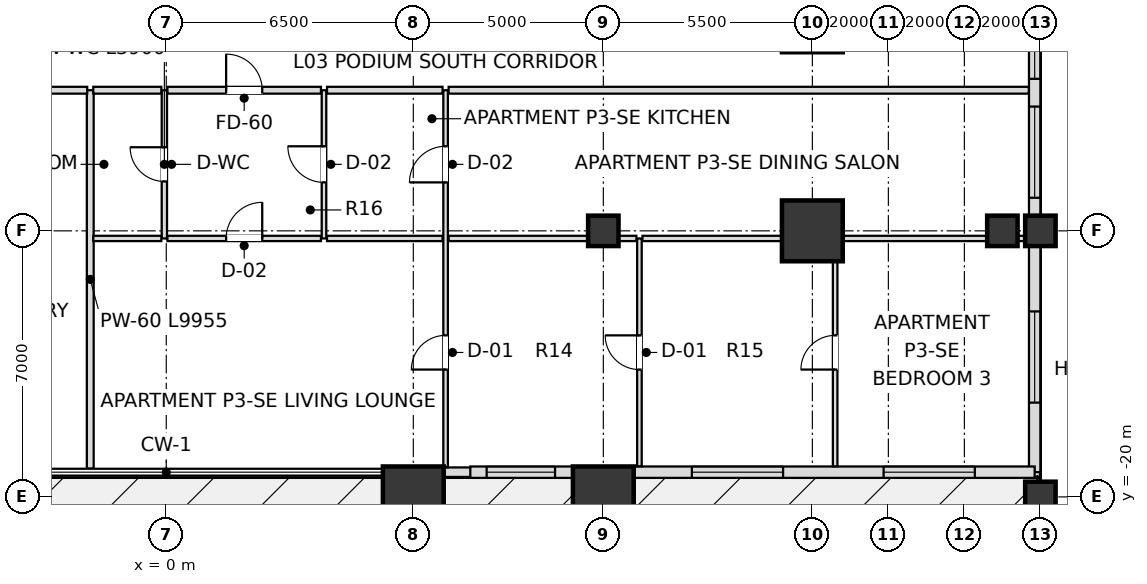
"""IFC4 building model, lengths in metres.
Left out: names, types, materials, properties, quantities, classifications, styles, units other than length and angle.
Written with IfcOpenShell. Run it as: python <this file> out.ifc"""

import sys

from ifc_helpers import new_model, si_unit, direction, frame, frame_2d, origin, origin_2d, place, context, subcontext, project, spatial, rectangle, extrude, element, fill, save


model = new_model("IFC4")
c1 = context("Model", 3, precision=1e-05, world=origin(), true_north=direction((0.0, 1.0)))
c2 = subcontext(c1, "Body", "Model", "MODEL_VIEW")
j1 = project(units=[si_unit("LENGTHUNIT", "METRE"), si_unit("PLANEANGLEUNIT", "RADIAN")], contexts=[c1])
p1 = place(None, origin())
s1 = spatial("IfcSite", under=j1, at=p1, CompositionType="ELEMENT")
p2 = place(p1, origin())
s2 = spatial("IfcBuilding", under=s1, at=p2, CompositionType="ELEMENT")
p3 = place(p2, frame((0.0, 0.0, 16.8)))
s3 = spatial("IfcBuildingStorey", under=s2, at=p3, CompositionType="ELEMENT", Elevation=16.8)
for number, where, z_axis, x_axis in (
    (1, (6.5, -20.0, 0.0), (0.0, 0.0, 1.0), (1.0, 0.0, 0.0)),
    (2, (11.5, -20.0, 0.0), (0.0, 0.0, 1.0), (1.0, 0.0, 0.0)),
    (3, (17.0, -13.0, 0.0), (0.0, 0.0, 1.0), (1.0, 0.0, 0.0)),
):
    element("IfcColumn", number, at=place(p3, frame(where, z_axis=z_axis, x_axis=x_axis)), inside=s3, PredefinedType="USERDEFINED", context=c2, shape_type="SweptSolid", body=[
        extrude(rectangle(XDim=1.6, YDim=1.6, at=origin_2d()), origin(), (0.0, 0.0, 1.0), 5.4),
    ])
for number, where, z_axis, x_axis in (
    (4, (23.0, -20.0, 0.0), (0.0, 0.0, 1.0), (1.0, 0.0, 0.0)),
    (5, (23.0, -13.0, 0.0), (0.0, 0.0, 1.0), (1.0, 0.0, 0.0)),
    (6, (11.5, -13.0, 0.0), (0.0, 0.0, 1.0), (1.0, 0.0, 0.0)),
    (7, (22.0, -13.0, 0.0), (0.0, 0.0, 1.0), (1.0, 0.0, 0.0)),
):
    element("IfcColumn", number, at=place(p3, frame(where, z_axis=z_axis, x_axis=x_axis)), inside=s3, PredefinedType="COLUMN", context=c2, shape_type="SweptSolid", body=[
        extrude(rectangle(XDim=0.8, YDim=0.8, at=origin_2d()), origin(), (0.0, 0.0, 1.0), 5.4),
    ])
p4 = place(p3, frame((22.85, -19.35, 0.0), z_axis=(0.0, 0.0, 1.0), x_axis=(0.0, 1.0, 0.0)))
e8 = element("IfcWall", 8, at=p4, inside=s3, PredefinedType="SOLIDWALL", context=c2, shape_type="SweptSolid", body=[
    extrude(rectangle(XDim=38.7, YDim=0.3, at=frame_2d((19.35, 0.0))), origin(), (0.0, 0.0, 1.0), 4.476),
])
p5 = place(p4, frame((1.83, 0.0, 0.8)))
e9 = element("IfcOpeningElement", 9, at=p5, cuts=e8, PredefinedType="OPENING", context=c2, shape_type="SweptSolid", body=[
    extrude(rectangle(XDim=2.4, YDim=2.2, at=frame_2d((1.2, 1.1))), frame((0.0, 0.16, 0.0), z_axis=(0.0, -1.0, 0.0), x_axis=(1.0, 0.0, 0.0)), (0.0, 0.0, 1.0), 0.32),
])
p6 = place(p4, frame((7.22, 0.0, 0.8)))
e10 = element("IfcOpeningElement", 10, at=p6, cuts=e8, PredefinedType="OPENING", context=c2, shape_type="SweptSolid", body=[
    extrude(rectangle(XDim=2.4, YDim=2.2, at=frame_2d((1.2, 1.1))), frame((0.0, 0.16, 0.0), z_axis=(0.0, -1.0, 0.0), x_axis=(1.0, 0.0, 0.0)), (0.0, 0.0, 1.0), 0.32),
])
p7 = place(p4, frame((10.35, 0.0, 0.72)))
e11 = element("IfcOpeningElement", 11, at=p7, cuts=e8, PredefinedType="OPENING", context=c2, shape_type="SweptSolid", body=[
    extrude(rectangle(XDim=1.2, YDim=1.68, at=frame_2d((0.6, 0.84))), frame((0.0, 0.16, 0.0), z_axis=(0.0, -1.0, 0.0), x_axis=(1.0, 0.0, 0.0)), (0.0, 0.0, 1.0), 0.32),
])
p8 = place(p4, frame((13.405, 0.0, 0.8)))
e12 = element("IfcOpeningElement", 12, at=p8, cuts=e8, PredefinedType="OPENING", context=c2, shape_type="SweptSolid", body=[
    extrude(rectangle(XDim=2.4, YDim=2.2, at=frame_2d((1.2, 1.1))), frame((0.0, 0.16, 0.0), z_axis=(0.0, -1.0, 0.0), x_axis=(1.0, 0.0, 0.0)), (0.0, 0.0, 1.0), 0.32),
])
p9 = place(p4, frame((18.595, 0.0, 0.8)))
e13 = element("IfcOpeningElement", 13, at=p9, cuts=e8, PredefinedType="OPENING", context=c2, shape_type="SweptSolid", body=[
    extrude(rectangle(XDim=2.4, YDim=2.2, at=frame_2d((1.2, 1.1))), frame((0.0, 0.16, 0.0), z_axis=(0.0, -1.0, 0.0), x_axis=(1.0, 0.0, 0.0)), (0.0, 0.0, 1.0), 0.32),
])
p10 = place(p4, frame((23.5, 0.0, 0.8)))
e14 = element("IfcOpeningElement", 14, at=p10, cuts=e8, PredefinedType="OPENING", context=c2, shape_type="SweptSolid", body=[
    extrude(rectangle(XDim=2.4, YDim=2.2, at=frame_2d((1.2, 1.1))), frame((0.0, 0.16, 0.0), z_axis=(0.0, -1.0, 0.0), x_axis=(1.0, 0.0, 0.0)), (0.0, 0.0, 1.0), 0.32),
])
p11 = place(p4, frame((27.15, 0.0, 0.72)))
e15 = element("IfcOpeningElement", 15, at=p11, cuts=e8, PredefinedType="OPENING", context=c2, shape_type="SweptSolid", body=[
    extrude(rectangle(XDim=1.2, YDim=1.68, at=frame_2d((0.6, 0.84))), frame((0.0, 0.16, 0.0), z_axis=(0.0, -1.0, 0.0), x_axis=(1.0, 0.0, 0.0)), (0.0, 0.0, 1.0), 0.32),
])
p12 = place(p4, frame((29.08, 0.0, 0.8)))
e16 = element("IfcOpeningElement", 16, at=p12, cuts=e8, PredefinedType="OPENING", context=c2, shape_type="SweptSolid", body=[
    extrude(rectangle(XDim=2.4, YDim=2.2, at=frame_2d((1.2, 1.1))), frame((0.0, 0.16, 0.0), z_axis=(0.0, -1.0, 0.0), x_axis=(1.0, 0.0, 0.0)), (0.0, 0.0, 1.0), 0.32),
])
p13 = place(p4, frame((34.47, 0.0, 0.8)))
e17 = element("IfcOpeningElement", 17, at=p13, cuts=e8, PredefinedType="OPENING", context=c2, shape_type="SweptSolid", body=[
    extrude(rectangle(XDim=2.4, YDim=2.2, at=frame_2d((1.2, 1.1))), frame((0.0, 0.16, 0.0), z_axis=(0.0, -1.0, 0.0), x_axis=(1.0, 0.0, 0.0)), (0.0, 0.0, 1.0), 0.32),
])
p14 = place(p3, frame((7.295, -19.35, 0.0), z_axis=(0.0, 0.0, 1.0), x_axis=(1.0, 0.0, 0.0)))
e18 = element("IfcWall", 18, at=p14, inside=s3, PredefinedType="SOLIDWALL", context=c2, shape_type="SweptSolid", body=[
    extrude(rectangle(XDim=0.73, YDim=0.25, at=frame_2d((0.365, 0.0))), origin(), (0.0, 0.0, 1.0), 5.12),
])
p15 = place(p3, frame((22.85, -19.35, 0.0), z_axis=(0.0, 0.0, 1.0), x_axis=(-1.0, 0.0, 0.0)))
e19 = element("IfcWall", 19, at=p15, inside=s3, PredefinedType="SOLIDWALL", context=c2, shape_type="SweptSolid", body=[
    extrude(rectangle(XDim=14.85, YDim=0.3, at=frame_2d((7.425, 0.0))), origin(), (0.0, 0.0, 1.0), 5.12),
])
p16 = place(p15, frame((1.575, 0.0, 0.8)))
e20 = element("IfcOpeningElement", 20, at=p16, cuts=e19, PredefinedType="OPENING", context=c2, shape_type="SweptSolid", body=[
    extrude(rectangle(XDim=2.4, YDim=2.2, at=frame_2d((1.2, 1.1))), frame((0.0, 0.16, 0.0), z_axis=(0.0, -1.0, 0.0), x_axis=(1.0, 0.0, 0.0)), (0.0, 0.0, 1.0), 0.32),
])
p17 = place(p15, frame((6.62, 0.0, 0.8)))
e21 = element("IfcOpeningElement", 21, at=p17, cuts=e19, PredefinedType="OPENING", context=c2, shape_type="SweptSolid", body=[
    extrude(rectangle(XDim=2.4, YDim=2.2, at=frame_2d((1.2, 1.1))), frame((0.0, 0.16, 0.0), z_axis=(0.0, -1.0, 0.0), x_axis=(1.0, 0.0, 0.0)), (0.0, 0.0, 1.0), 0.32),
])
p18 = place(p15, frame((12.62, 0.0, 0.72)))
e22 = element("IfcOpeningElement", 22, at=p18, cuts=e19, PredefinedType="OPENING", context=c2, shape_type="SweptSolid", body=[
    extrude(rectangle(XDim=1.8, YDim=1.68, at=frame_2d((0.9, 0.84))), frame((0.0, 0.16, 0.0), z_axis=(0.0, -1.0, 0.0), x_axis=(1.0, 0.0, 0.0)), (0.0, 0.0, 1.0), 0.32),
])
p19 = place(p3, frame((-2.0, -19.255, 0.0), z_axis=(0.0, 0.0, 1.0), x_axis=(0.0, 1.0, 0.0)))
e23 = element("IfcWall", 23, at=p19, inside=s3, PredefinedType="PARTITIONING", context=c2, shape_type="SweptSolid", body=[
    extrude(rectangle(XDim=9.955, YDim=0.18, at=frame_2d((4.978, 0.0))), origin(), (0.0, 0.0, 1.0), 4.642),
])
p20 = place(p3, frame((-0.05, -13.2, 0.0), z_axis=(0.0, 0.0, 1.0), x_axis=(0.0, 1.0, 0.0)))
e24 = element("IfcWall", 24, at=p20, inside=s3, PredefinedType="PARTITIONING", context=c2, shape_type="SweptSolid", body=[
    extrude(rectangle(XDim=3.9, YDim=0.14, at=frame_2d((1.95, 0.0))), origin(), (0.0, 0.0, 1.0), 5.12),
])
p21 = place(p20, frame((1.5, 0.0, 0.0)))
e25 = element("IfcOpeningElement", 25, at=p21, cuts=e24, PredefinedType="OPENING", context=c2, shape_type="SweptSolid", body=[
    extrude(rectangle(XDim=0.9, YDim=2.1, at=frame_2d((0.45, 1.05))), frame((0.0, 0.08, 0.0), z_axis=(0.0, -1.0, 0.0), x_axis=(1.0, 0.0, 0.0)), (0.0, 0.0, 1.0), 0.16),
])
p22 = place(p3, frame((4.15, -13.2, 0.0), z_axis=(0.0, 0.0, 1.0), x_axis=(0.0, 1.0, 0.0)))
e26 = element("IfcWall", 26, at=p22, inside=s3, PredefinedType="PARTITIONING", context=c2, shape_type="SweptSolid", body=[
    extrude(rectangle(XDim=3.9, YDim=0.12, at=frame_2d((1.95, 0.0))), origin(), (0.0, 0.0, 1.0), 5.12),
])
p23 = place(p22, frame((1.475, 0.0, 0.0)))
e27 = element("IfcOpeningElement", 27, at=p23, cuts=e26, PredefinedType="OPENING", context=c2, shape_type="SweptSolid", body=[
    extrude(rectangle(XDim=0.95, YDim=2.1, at=frame_2d((0.475, 1.05))), frame((0.0, 0.07, 0.0), z_axis=(0.0, -1.0, 0.0), x_axis=(1.0, 0.0, 0.0)), (0.0, 0.0, 1.0), 0.14),
])
p24 = place(p3, frame((7.35, -19.22, 0.0), z_axis=(0.0, 0.0, 1.0), x_axis=(0.0, 1.0, 0.0)))
e28 = element("IfcWall", 28, at=p24, inside=s3, PredefinedType="PARTITIONING", context=c2, shape_type="SweptSolid", body=[
    extrude(rectangle(XDim=9.92, YDim=0.12, at=frame_2d((4.96, 0.0))), origin(), (0.0, 0.0, 1.0), 4.41),
])
p25 = place(p24, frame((7.495, 0.0, 0.0)))
e29 = element("IfcOpeningElement", 29, at=p25, cuts=e28, PredefinedType="OPENING", context=c2, shape_type="SweptSolid", body=[
    extrude(rectangle(XDim=0.95, YDim=2.1, at=frame_2d((0.475, 1.05))), frame((0.0, 0.07, 0.0), z_axis=(0.0, -1.0, 0.0), x_axis=(1.0, 0.0, 0.0)), (0.0, 0.0, 1.0), 0.14),
])
p26 = place(p24, frame((2.57, 0.0, 0.0)))
e30 = element("IfcOpeningElement", 30, at=p26, cuts=e28, PredefinedType="OPENING", context=c2, shape_type="SweptSolid", body=[
    extrude(rectangle(XDim=0.9, YDim=2.1, at=frame_2d((0.45, 1.05))), frame((0.0, 0.07, 0.0), z_axis=(0.0, -1.0, 0.0), x_axis=(1.0, 0.0, 0.0)), (0.0, 0.0, 1.0), 0.14),
])
p27 = place(p3, frame((12.45, -19.195, 0.0), z_axis=(0.0, 0.0, 1.0), x_axis=(0.0, 1.0, 0.0)))
e31 = element("IfcWall", 31, at=p27, inside=s3, PredefinedType="PARTITIONING", context=c2, shape_type="SweptSolid", body=[
    extrude(rectangle(XDim=5.995, YDim=0.12, at=frame_2d((2.998, 0.0))), origin(), (0.0, 0.0, 1.0), 5.12),
])
p28 = place(p27, frame((2.545, 0.0, 0.0)))
e32 = element("IfcOpeningElement", 32, at=p28, cuts=e31, PredefinedType="OPENING", context=c2, shape_type="SweptSolid", body=[
    extrude(rectangle(XDim=0.9, YDim=2.1, at=frame_2d((0.45, 1.05))), frame((0.0, 0.07, 0.0), z_axis=(0.0, -1.0, 0.0), x_axis=(1.0, 0.0, 0.0)), (0.0, 0.0, 1.0), 0.14),
])
p29 = place(p3, frame((17.6, -19.195, 0.0), z_axis=(0.0, 0.0, 1.0), x_axis=(0.0, 1.0, 0.0)))
e33 = element("IfcWall", 33, at=p29, inside=s3, PredefinedType="PARTITIONING", context=c2, shape_type="SweptSolid", body=[
    extrude(rectangle(XDim=5.995, YDim=0.12, at=frame_2d((2.998, 0.0))), origin(), (0.0, 0.0, 1.0), 5.12),
])
p30 = place(p29, frame((2.545, 0.0, 0.0)))
e34 = element("IfcOpeningElement", 34, at=p30, cuts=e33, PredefinedType="OPENING", context=c2, shape_type="SweptSolid", body=[
    extrude(rectangle(XDim=0.9, YDim=2.1, at=frame_2d((0.45, 1.05))), frame((0.0, 0.07, 0.0), z_axis=(0.0, -1.0, 0.0), x_axis=(1.0, 0.0, 0.0)), (0.0, 0.0, 1.0), 0.14),
])
p31 = place(p3, frame((-1.92, -13.2, 0.0), z_axis=(0.0, 0.0, 1.0), x_axis=(1.0, 0.0, 0.0)))
e35 = element("IfcWall", 35, at=p31, inside=s3, PredefinedType="PARTITIONING", context=c2, shape_type="SweptSolid", body=[
    extrude(rectangle(XDim=1.79, YDim=0.14, at=frame_2d((0.895, 0.0))), origin(), (0.0, 0.0, 1.0), 5.12),
])
p32 = place(p3, frame((0.03, -13.2, 0.0), z_axis=(0.0, 0.0, 1.0), x_axis=(1.0, 0.0, 0.0)))
e36 = element("IfcWall", 36, at=p32, inside=s3, PredefinedType="PARTITIONING", context=c2, shape_type="SweptSolid", body=[
    extrude(rectangle(XDim=4.04, YDim=0.14, at=frame_2d((2.02, 0.0))), origin(), (0.0, 0.0, 1.0), 5.12),
])
p33 = place(p32, frame((1.545, 0.0, 0.0)))
e37 = element("IfcOpeningElement", 37, at=p33, cuts=e36, PredefinedType="OPENING", context=c2, shape_type="SweptSolid", body=[
    extrude(rectangle(XDim=0.95, YDim=2.1, at=frame_2d((0.475, 1.05))), frame((0.0, 0.08, 0.0), z_axis=(0.0, -1.0, 0.0), x_axis=(1.0, 0.0, 0.0)), (0.0, 0.0, 1.0), 0.16),
])
p34 = place(p3, frame((4.23, -13.2, 0.0), z_axis=(0.0, 0.0, 1.0), x_axis=(1.0, 0.0, 0.0)))
e38 = element("IfcWall", 38, at=p34, inside=s3, PredefinedType="PARTITIONING", context=c2, shape_type="SweptSolid", body=[
    extrude(rectangle(XDim=3.04, YDim=0.14, at=frame_2d((1.52, 0.0))), origin(), (0.0, 0.0, 1.0), 4.41),
])
p35 = place(p3, frame((7.43, -13.2, 0.0), z_axis=(0.0, 0.0, 1.0), x_axis=(1.0, 0.0, 0.0)))
e39 = element("IfcWall", 39, at=p35, inside=s3, PredefinedType="PARTITIONING", context=c2, shape_type="SweptSolid", body=[
    extrude(rectangle(XDim=4.94, YDim=0.14, at=frame_2d((2.47, 0.0))), origin(), (0.0, 0.0, 1.0), 4.41),
])
p36 = place(p3, frame((12.53, -13.2, 0.0), z_axis=(0.0, 0.0, 1.0), x_axis=(1.0, 0.0, 0.0)))
e40 = element("IfcWall", 40, at=p36, inside=s3, PredefinedType="PARTITIONING", context=c2, shape_type="SweptSolid", body=[
    extrude(rectangle(XDim=4.99, YDim=0.14, at=frame_2d((2.495, 0.0))), origin(), (0.0, 0.0, 1.0), 4.41),
])
p37 = place(p3, frame((17.68, -13.2, 0.0), z_axis=(0.0, 0.0, 1.0), x_axis=(1.0, 0.0, 0.0)))
e41 = element("IfcWall", 41, at=p37, inside=s3, PredefinedType="PARTITIONING", context=c2, shape_type="SweptSolid", body=[
    extrude(rectangle(XDim=5.015, YDim=0.14, at=frame_2d((2.508, 0.0))), origin(), (0.0, 0.0, 1.0), 5.12),
])
p38 = place(p3, frame((-22.695, -9.3, 0.0), z_axis=(0.0, 0.0, 1.0), x_axis=(1.0, 0.0, 0.0)))
e42 = element("IfcWall", 42, at=p38, inside=s3, PredefinedType="PARTITIONING", context=c2, shape_type="SweptSolid", body=[
    extrude(rectangle(XDim=20.615, YDim=0.18, at=frame_2d((10.308, 0.0))), origin(), (0.0, 0.0, 1.0), 4.41),
])
p39 = place(p38, frame((11.22, 0.0, 0.0)))
e43 = element("IfcOpeningElement", 43, at=p39, cuts=e42, PredefinedType="OPENING", context=c2, shape_type="SweptSolid", body=[
    extrude(rectangle(XDim=0.95, YDim=2.15, at=frame_2d((0.475, 1.075))), frame((0.0, 0.1, 0.0), z_axis=(0.0, -1.0, 0.0), x_axis=(1.0, 0.0, 0.0)), (0.0, 0.0, 1.0), 0.2),
])
p40 = place(p3, frame((-1.92, -9.3, 0.0), z_axis=(0.0, 0.0, 1.0), x_axis=(1.0, 0.0, 0.0)))
e44 = element("IfcWall", 44, at=p40, inside=s3, PredefinedType="PARTITIONING", context=c2, shape_type="SweptSolid", body=[
    extrude(rectangle(XDim=1.79, YDim=0.18, at=frame_2d((0.895, 0.0))), origin(), (0.0, 0.0, 1.0), 5.12),
])
p41 = place(p3, frame((0.03, -9.3, 0.0), z_axis=(0.0, 0.0, 1.0), x_axis=(1.0, 0.0, 0.0)))
e45 = element("IfcWall", 45, at=p41, inside=s3, PredefinedType="PARTITIONING", context=c2, shape_type="SweptSolid", body=[
    extrude(rectangle(XDim=4.04, YDim=0.18, at=frame_2d((2.02, 0.0))), origin(), (0.0, 0.0, 1.0), 5.12),
])
p42 = place(p41, frame((1.545, 0.0, 0.0)))
e46 = element("IfcOpeningElement", 46, at=p42, cuts=e45, PredefinedType="OPENING", context=c2, shape_type="SweptSolid", body=[
    extrude(rectangle(XDim=0.95, YDim=2.15, at=frame_2d((0.475, 1.075))), frame((0.0, 0.1, 0.0), z_axis=(0.0, -1.0, 0.0), x_axis=(1.0, 0.0, 0.0)), (0.0, 0.0, 1.0), 0.2),
])
p43 = place(p3, frame((4.23, -9.3, 0.0), z_axis=(0.0, 0.0, 1.0), x_axis=(1.0, 0.0, 0.0)))
e47 = element("IfcWall", 47, at=p43, inside=s3, PredefinedType="PARTITIONING", context=c2, shape_type="SweptSolid", body=[
    extrude(rectangle(XDim=3.04, YDim=0.18, at=frame_2d((1.52, 0.0))), origin(), (0.0, 0.0, 1.0), 4.41),
])
p44 = place(p3, frame((7.43, -9.3, 0.0), z_axis=(0.0, 0.0, 1.0), x_axis=(1.0, 0.0, 0.0)))
e48 = element("IfcWall", 48, at=p44, inside=s3, PredefinedType="PARTITIONING", context=c2, shape_type="SweptSolid", body=[
    extrude(rectangle(XDim=15.265, YDim=0.18, at=frame_2d((7.633, 0.0))), origin(), (0.0, 0.0, 1.0), 4.41),
])
p45 = place(p5, origin())
e49 = element("IfcWindow", 49, at=p45, inside=s3, PartitioningType="SINGLE_PANEL", PredefinedType="WINDOW", context=c2, shape_type="SweptSolid", body=[
    extrude(rectangle(XDim=2.4, YDim=2.2, at=frame_2d((1.2, 1.1))), frame((0.0, 0.03, 0.0), z_axis=(0.0, -1.0, 0.0), x_axis=(1.0, 0.0, 0.0)), (0.0, 0.0, 1.0), 0.06),
])
fill(e9, e49)
p46 = place(p6, origin())
e50 = element("IfcWindow", 50, at=p46, inside=s3, PartitioningType="SINGLE_PANEL", PredefinedType="WINDOW", context=c2, shape_type="SweptSolid", body=[
    extrude(rectangle(XDim=2.4, YDim=2.2, at=frame_2d((1.2, 1.1))), frame((0.0, 0.03, 0.0), z_axis=(0.0, -1.0, 0.0), x_axis=(1.0, 0.0, 0.0)), (0.0, 0.0, 1.0), 0.06),
])
fill(e10, e50)
p47 = place(p7, origin())
e51 = element("IfcWindow", 51, at=p47, inside=s3, PartitioningType="SINGLE_PANEL", PredefinedType="WINDOW", context=c2, shape_type="SweptSolid", body=[
    extrude(rectangle(XDim=1.2, YDim=1.68, at=frame_2d((0.6, 0.84))), frame((0.0, 0.03, 0.0), z_axis=(0.0, -1.0, 0.0), x_axis=(1.0, 0.0, 0.0)), (0.0, 0.0, 1.0), 0.06),
])
fill(e11, e51)
p48 = place(p16, origin())
e52 = element("IfcWindow", 52, at=p48, inside=s3, PartitioningType="SINGLE_PANEL", PredefinedType="WINDOW", context=c2, shape_type="SweptSolid", body=[
    extrude(rectangle(XDim=2.4, YDim=2.2, at=frame_2d((1.2, 1.1))), frame((0.0, 0.03, 0.0), z_axis=(0.0, -1.0, 0.0), x_axis=(1.0, 0.0, 0.0)), (0.0, 0.0, 1.0), 0.06),
])
fill(e20, e52)
p49 = place(p17, origin())
e53 = element("IfcWindow", 53, at=p49, inside=s3, PartitioningType="SINGLE_PANEL", PredefinedType="WINDOW", context=c2, shape_type="SweptSolid", body=[
    extrude(rectangle(XDim=2.4, YDim=2.2, at=frame_2d((1.2, 1.1))), frame((0.0, 0.03, 0.0), z_axis=(0.0, -1.0, 0.0), x_axis=(1.0, 0.0, 0.0)), (0.0, 0.0, 1.0), 0.06),
])
fill(e21, e53)
p50 = place(p18, origin())
e54 = element("IfcWindow", 54, at=p50, inside=s3, PartitioningType="SINGLE_PANEL", PredefinedType="WINDOW", context=c2, shape_type="SweptSolid", body=[
    extrude(rectangle(XDim=1.8, YDim=1.68, at=frame_2d((0.9, 0.84))), frame((0.0, 0.03, 0.0), z_axis=(0.0, -1.0, 0.0), x_axis=(1.0, 0.0, 0.0)), (0.0, 0.0, 1.0), 0.06),
])
fill(e22, e54)
p51 = place(p21, origin())
e55 = element("IfcDoor", 55, at=p51, inside=s3, OperationType="SINGLE_SWING_RIGHT", PredefinedType="DOOR", context=c2, shape_type="SweptSolid", body=[
    extrude(rectangle(XDim=0.9, YDim=2.1, at=frame_2d((0.45, 1.05))), frame((0.0, 0.025, 0.0), z_axis=(0.0, -1.0, 0.0), x_axis=(1.0, 0.0, 0.0)), (0.0, 0.0, 1.0), 0.05),
])
fill(e25, e55)
p52 = place(p42, origin())
e56 = element("IfcDoor", 56, at=p52, inside=s3, OperationType="SINGLE_SWING_LEFT", PredefinedType="DOOR", context=c2, shape_type="SweptSolid", body=[
    extrude(rectangle(XDim=0.95, YDim=2.15, at=frame_2d((0.475, 1.075))), frame((0.0, 0.025, 0.0), z_axis=(0.0, -1.0, 0.0), x_axis=(1.0, 0.0, 0.0)), (0.0, 0.0, 1.0), 0.05),
])
fill(e46, e56)
p53 = place(p23, origin())
e57 = element("IfcDoor", 57, at=p53, inside=s3, OperationType="SINGLE_SWING_RIGHT", PredefinedType="DOOR", context=c2, shape_type="SweptSolid", body=[
    extrude(rectangle(XDim=0.95, YDim=2.1, at=frame_2d((0.475, 1.05))), frame((0.0, 0.025, 0.0), z_axis=(0.0, -1.0, 0.0), x_axis=(1.0, 0.0, 0.0)), (0.0, 0.0, 1.0), 0.05),
])
fill(e27, e57)
p54 = place(p25, origin())
e58 = element("IfcDoor", 58, at=p54, inside=s3, OperationType="SINGLE_SWING_LEFT", PredefinedType="DOOR", context=c2, shape_type="SweptSolid", body=[
    extrude(rectangle(XDim=0.95, YDim=2.1, at=frame_2d((0.475, 1.05))), frame((0.0, 0.025, 0.0), z_axis=(0.0, -1.0, 0.0), x_axis=(1.0, 0.0, 0.0)), (0.0, 0.0, 1.0), 0.05),
])
fill(e29, e58)
p55 = place(p33, origin())
e59 = element("IfcDoor", 59, at=p55, inside=s3, OperationType="SINGLE_SWING_RIGHT", PredefinedType="DOOR", context=c2, shape_type="SweptSolid", body=[
    extrude(rectangle(XDim=0.95, YDim=2.1, at=frame_2d((0.475, 1.05))), frame((0.0, 0.025, 0.0), z_axis=(0.0, -1.0, 0.0), x_axis=(1.0, 0.0, 0.0)), (0.0, 0.0, 1.0), 0.05),
])
fill(e37, e59)
p56 = place(p26, origin())
e60 = element("IfcDoor", 60, at=p56, inside=s3, OperationType="SINGLE_SWING_LEFT", PredefinedType="DOOR", context=c2, shape_type="SweptSolid", body=[
    extrude(rectangle(XDim=0.9, YDim=2.1, at=frame_2d((0.45, 1.05))), frame((0.0, 0.025, 0.0), z_axis=(0.0, -1.0, 0.0), x_axis=(1.0, 0.0, 0.0)), (0.0, 0.0, 1.0), 0.05),
])
fill(e30, e60)
p57 = place(p28, origin())
e61 = element("IfcDoor", 61, at=p57, inside=s3, OperationType="SINGLE_SWING_RIGHT", PredefinedType="DOOR", context=c2, shape_type="SweptSolid", body=[
    extrude(rectangle(XDim=0.9, YDim=2.1, at=frame_2d((0.45, 1.05))), frame((0.0, 0.025, 0.0), z_axis=(0.0, -1.0, 0.0), x_axis=(1.0, 0.0, 0.0)), (0.0, 0.0, 1.0), 0.05),
])
fill(e32, e61)
p58 = place(p30, origin())
e62 = element("IfcDoor", 62, at=p58, inside=s3, OperationType="SINGLE_SWING_LEFT", PredefinedType="DOOR", context=c2, shape_type="SweptSolid", body=[
    extrude(rectangle(XDim=0.9, YDim=2.1, at=frame_2d((0.45, 1.05))), frame((0.0, 0.025, 0.0), z_axis=(0.0, -1.0, 0.0), x_axis=(1.0, 0.0, 0.0)), (0.0, 0.0, 1.0), 0.05),
])
fill(e34, e62)
save(model, sys.argv[1])
